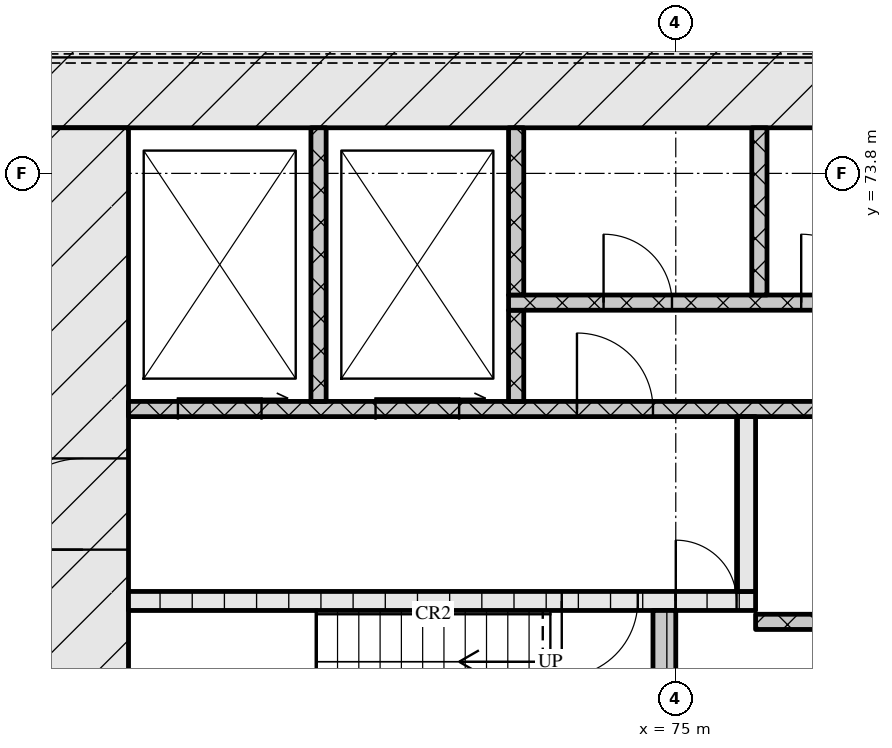
"""IFC4 building model, lengths in metres.
Left out: names, types, materials, properties, quantities, classifications, styles, units other than length and angle.
Written with IfcOpenShell. Run it as: python <this file> out.ifc"""

import sys

from ifc_helpers import new_model, si_unit, direction, frame, frame_2d, origin, place, context, subcontext, project, spatial, rectangle, extrude, element, fill, save


model = new_model("IFC4")
c1 = context("Model", 3, precision=1e-05, world=origin(), true_north=direction((0.0, 1.0)))
c2 = subcontext(c1, "Body", "Model", "MODEL_VIEW")
j1 = project(units=[si_unit("LENGTHUNIT", "METRE"), si_unit("PLANEANGLEUNIT", "RADIAN")], contexts=[c1])
p1 = place(None, origin())
s1 = spatial("IfcSite", under=j1, at=p1, CompositionType="ELEMENT")
p2 = place(p1, origin())
s2 = spatial("IfcBuilding", under=s1, at=p2, CompositionType="ELEMENT")
p3 = place(p2, frame((0.0, 0.0, 32.7)))
s3 = spatial("IfcBuildingStorey", under=s2, at=p3, CompositionType="ELEMENT", Elevation=32.7)
p4 = place(p3, frame((66.6, 75.0, 0.0), z_axis=(0.0, 0.0, 1.0), x_axis=(1.0, 0.0, 0.0)))
e1 = element("IfcWall", 1, at=p4, inside=s3, PredefinedType="SOLIDWALL", context=c2, shape_type="SweptSolid", body=[
    extrude(rectangle(XDim=42.0, YDim=1.2, at=frame_2d((21.0, 0.0))), origin(), (0.0, 0.0, 1.0), 4.22),
])
p5 = place(p3, frame((67.2, 62.4, 0.0), z_axis=(0.0, 0.0, 1.0), x_axis=(0.0, 1.0, 0.0)))
e2 = element("IfcWall", 2, at=p5, inside=s3, PredefinedType="SOLIDWALL", context=c2, shape_type="SweptSolid", body=[
    extrude(rectangle(XDim=12.0, YDim=1.2, at=frame_2d((6.0, 0.0))), origin(), (0.0, 0.0, 1.0), 4.22),
])
p6 = place(p5, frame((6.45, 0.0, 0.0)))
e3 = element("IfcOpeningElement", 3, at=p6, cuts=e2, PredefinedType="OPENING", context=c2, shape_type="SweptSolid", body=[
    extrude(rectangle(XDim=1.2, YDim=2.1, at=frame_2d((0.6, 1.05))), frame((0.0, 0.61, 0.0), z_axis=(0.0, -1.0, 0.0), x_axis=(1.0, 0.0, 0.0)), (0.0, 0.0, 1.0), 1.22),
])
p7 = place(p3, frame((74.85, 65.2, 0.0), z_axis=(0.0, 0.0, 1.0), x_axis=(0.0, 1.0, 0.0)))
e4 = element("IfcWall", 4, at=p7, inside=s3, PredefinedType="SOLIDWALL", context=c2, shape_type="SweptSolid", body=[
    extrude(rectangle(XDim=2.85, YDim=0.3, at=frame_2d((1.425, 0.0))), origin(), (0.0, 0.0, 1.0), 4.22),
])
p8 = place(p3, frame((76.05, 67.9, 0.0), z_axis=(0.0, 0.0, 1.0), x_axis=(1.0, 0.0, 0.0)))
e5 = element("IfcWall", 5, at=p8, inside=s3, PredefinedType="SOLIDWALL", context=c2, shape_type="SweptSolid", body=[
    extrude(rectangle(XDim=23.1, YDim=0.2, at=frame_2d((11.55, 0.0))), origin(), (0.0, 0.0, 1.0), 4.22),
])
p9 = place(p8, frame((8.35, 0.0, 0.0)))
e6 = element("IfcOpeningElement", 6, at=p9, cuts=e5, PredefinedType="OPENING", context=c2, shape_type="SweptSolid", body=[
    extrude(rectangle(XDim=1.1, YDim=2.1, at=frame_2d((0.55, 1.05))), frame((0.0, 0.11, 0.0), z_axis=(0.0, -1.0, 0.0), x_axis=(1.0, 0.0, 0.0)), (0.0, 0.0, 1.0), 0.22),
])
p10 = place(p8, frame((10.85, 0.0, 0.0)))
e7 = element("IfcOpeningElement", 7, at=p10, cuts=e5, PredefinedType="OPENING", context=c2, shape_type="SweptSolid", body=[
    extrude(rectangle(XDim=1.1, YDim=2.1, at=frame_2d((0.55, 1.05))), frame((0.0, 0.11, 0.0), z_axis=(0.0, -1.0, 0.0), x_axis=(1.0, 0.0, 0.0)), (0.0, 0.0, 1.0), 0.22),
])
p11 = place(p8, frame((13.55, 0.0, 0.0)))
e8 = element("IfcOpeningElement", 8, at=p11, cuts=e5, PredefinedType="OPENING", context=c2, shape_type="SweptSolid", body=[
    extrude(rectangle(XDim=1.0, YDim=2.1, at=frame_2d((0.5, 1.05))), frame((0.0, 0.11, 0.0), z_axis=(0.0, -1.0, 0.0), x_axis=(1.0, 0.0, 0.0)), (0.0, 0.0, 1.0), 0.22),
])
p12 = place(p3, frame((67.8, 68.175, 0.0), z_axis=(0.0, 0.0, 1.0), x_axis=(1.0, 0.0, 0.0)))
e9 = element("IfcWall", 9, at=p12, inside=s3, PredefinedType="SOLIDWALL", context=c2, shape_type="SweptSolid", body=[
    extrude(rectangle(XDim=8.25, YDim=0.25, at=frame_2d((4.125, 0.0))), origin(), (0.0, 0.0, 1.0), 4.22),
])
p13 = place(p12, frame((5.7, 0.0, 0.0)))
e10 = element("IfcOpeningElement", 10, at=p13, cuts=e9, PredefinedType="OPENING", context=c2, shape_type="SweptSolid", body=[
    extrude(rectangle(XDim=1.0, YDim=2.1, at=frame_2d((0.5, 1.05))), frame((0.0, 0.135, 0.0), z_axis=(0.0, -1.0, 0.0), x_axis=(1.0, 0.0, 0.0)), (0.0, 0.0, 1.0), 0.27),
])
p14 = place(p12, frame((7.2, 0.0, 0.0)))
e11 = element("IfcOpeningElement", 11, at=p14, cuts=e9, PredefinedType="OPENING", context=c2, shape_type="SweptSolid", body=[
    extrude(rectangle(XDim=0.8, YDim=2.1, at=frame_2d((0.4, 1.05))), frame((0.0, 0.135, 0.0), z_axis=(0.0, -1.0, 0.0), x_axis=(1.0, 0.0, 0.0)), (0.0, 0.0, 1.0), 0.27),
])
p15 = place(p3, frame((75.925, 68.3, 0.0), z_axis=(0.0, 0.0, 1.0), x_axis=(0.0, 1.0, 0.0)))
e12 = element("IfcWall", 12, at=p15, inside=s3, PredefinedType="SOLIDWALL", context=c2, shape_type="SweptSolid", body=[
    extrude(rectangle(XDim=2.3, YDim=0.25, at=frame_2d((1.15, 0.0))), origin(), (0.0, 0.0, 1.0), 4.22),
])
p16 = place(p3, frame((67.8, 70.7, 0.0), z_axis=(0.0, 0.0, 1.0), x_axis=(1.0, 0.0, 0.0)))
e13 = element("IfcWall", 13, at=p16, inside=s3, PredefinedType="SOLIDWALL", context=c2, shape_type="SweptSolid", body=[
    extrude(rectangle(XDim=39.6, YDim=0.2, at=frame_2d((19.8, 0.0))), origin(), (0.0, 0.0, 1.0), 4.22),
])
p17 = place(p16, frame((0.65, 0.0, 0.0)))
e14 = element("IfcOpeningElement", 14, at=p17, cuts=e13, PredefinedType="OPENING", context=c2, shape_type="SweptSolid", body=[
    extrude(rectangle(XDim=1.1, YDim=2.1, at=frame_2d((0.55, 1.05))), frame((0.0, 0.11, 0.0), z_axis=(0.0, -1.0, 0.0), x_axis=(1.0, 0.0, 0.0)), (0.0, 0.0, 1.0), 0.22),
])
p18 = place(p16, frame((3.25, 0.0, 0.0)))
e15 = element("IfcOpeningElement", 15, at=p18, cuts=e13, PredefinedType="OPENING", context=c2, shape_type="SweptSolid", body=[
    extrude(rectangle(XDim=1.1, YDim=2.1, at=frame_2d((0.55, 1.05))), frame((0.0, 0.11, 0.0), z_axis=(0.0, -1.0, 0.0), x_axis=(1.0, 0.0, 0.0)), (0.0, 0.0, 1.0), 0.22),
])
p19 = place(p16, frame((5.9, 0.0, 0.0)))
e16 = element("IfcOpeningElement", 16, at=p19, cuts=e13, PredefinedType="OPENING", context=c2, shape_type="SweptSolid", body=[
    extrude(rectangle(XDim=1.0, YDim=2.1, at=frame_2d((0.5, 1.05))), frame((0.0, 0.11, 0.0), z_axis=(0.0, -1.0, 0.0), x_axis=(1.0, 0.0, 0.0)), (0.0, 0.0, 1.0), 0.22),
])
p20 = place(p16, frame((21.7, 0.0, 0.0)))
e17 = element("IfcOpeningElement", 17, at=p20, cuts=e13, PredefinedType="OPENING", context=c2, shape_type="SweptSolid", body=[
    extrude(rectangle(XDim=1.0, YDim=2.1, at=frame_2d((0.5, 1.05))), frame((0.0, 0.11, 0.0), z_axis=(0.0, -1.0, 0.0), x_axis=(1.0, 0.0, 0.0)), (0.0, 0.0, 1.0), 0.22),
])
p21 = place(p16, frame((32.7, 0.0, 0.0)))
e18 = element("IfcOpeningElement", 18, at=p21, cuts=e13, PredefinedType="OPENING", context=c2, shape_type="SweptSolid", body=[
    extrude(rectangle(XDim=1.0, YDim=2.1, at=frame_2d((0.5, 1.05))), frame((0.0, 0.11, 0.0), z_axis=(0.0, -1.0, 0.0), x_axis=(1.0, 0.0, 0.0)), (0.0, 0.0, 1.0), 0.22),
])
p22 = place(p16, frame((35.25, 0.0, 0.0)))
e19 = element("IfcOpeningElement", 19, at=p22, cuts=e13, PredefinedType="OPENING", context=c2, shape_type="SweptSolid", body=[
    extrude(rectangle(XDim=1.1, YDim=2.1, at=frame_2d((0.55, 1.05))), frame((0.0, 0.11, 0.0), z_axis=(0.0, -1.0, 0.0), x_axis=(1.0, 0.0, 0.0)), (0.0, 0.0, 1.0), 0.22),
])
p23 = place(p16, frame((37.85, 0.0, 0.0)))
e20 = element("IfcOpeningElement", 20, at=p23, cuts=e13, PredefinedType="OPENING", context=c2, shape_type="SweptSolid", body=[
    extrude(rectangle(XDim=1.1, YDim=2.1, at=frame_2d((0.55, 1.05))), frame((0.0, 0.11, 0.0), z_axis=(0.0, -1.0, 0.0), x_axis=(1.0, 0.0, 0.0)), (0.0, 0.0, 1.0), 0.22),
])
p24 = place(p3, frame((70.3, 70.8, 0.0), z_axis=(0.0, 0.0, 1.0), x_axis=(0.0, 1.0, 0.0)))
e21 = element("IfcWall", 21, at=p24, inside=s3, PredefinedType="SOLIDWALL", context=c2, shape_type="SweptSolid", body=[
    extrude(rectangle(XDim=3.6, YDim=0.2, at=frame_2d((1.8, 0.0))), origin(), (0.0, 0.0, 1.0), 4.22),
])
p25 = place(p3, frame((72.9, 70.8, 0.0), z_axis=(0.0, 0.0, 1.0), x_axis=(0.0, 1.0, 0.0)))
e22 = element("IfcWall", 22, at=p25, inside=s3, PredefinedType="SOLIDWALL", context=c2, shape_type="SweptSolid", body=[
    extrude(rectangle(XDim=1.2, YDim=0.2, at=frame_2d((0.6, 0.0))), origin(), (0.0, 0.0, 1.0), 4.22),
])
p26 = place(p3, frame((72.8, 72.1, 0.0), z_axis=(0.0, 0.0, 1.0), x_axis=(1.0, 0.0, 0.0)))
e23 = element("IfcWall", 23, at=p26, inside=s3, PredefinedType="SOLIDWALL", context=c2, shape_type="SweptSolid", body=[
    extrude(rectangle(XDim=11.0, YDim=0.2, at=frame_2d((5.5, 0.0))), origin(), (0.0, 0.0, 1.0), 4.22),
])
p27 = place(p26, frame((1.25, 0.0, 0.0)))
e24 = element("IfcOpeningElement", 24, at=p27, cuts=e23, PredefinedType="OPENING", context=c2, shape_type="SweptSolid", body=[
    extrude(rectangle(XDim=0.9, YDim=2.1, at=frame_2d((0.45, 1.05))), frame((0.0, 0.11, 0.0), z_axis=(0.0, -1.0, 0.0), x_axis=(1.0, 0.0, 0.0)), (0.0, 0.0, 1.0), 0.22),
])
p28 = place(p26, frame((3.85, 0.0, 0.0)))
e25 = element("IfcOpeningElement", 25, at=p28, cuts=e23, PredefinedType="OPENING", context=c2, shape_type="SweptSolid", body=[
    extrude(rectangle(XDim=0.9, YDim=2.1, at=frame_2d((0.45, 1.05))), frame((0.0, 0.11, 0.0), z_axis=(0.0, -1.0, 0.0), x_axis=(1.0, 0.0, 0.0)), (0.0, 0.0, 1.0), 0.22),
])
p29 = place(p26, frame((6.42, 0.0, 0.0)))
e26 = element("IfcOpeningElement", 26, at=p29, cuts=e23, PredefinedType="OPENING", context=c2, shape_type="SweptSolid", body=[
    extrude(rectangle(XDim=0.9, YDim=2.1, at=frame_2d((0.45, 1.05))), frame((0.0, 0.11, 0.0), z_axis=(0.0, -1.0, 0.0), x_axis=(1.0, 0.0, 0.0)), (0.0, 0.0, 1.0), 0.22),
])
p30 = place(p26, frame((9.195, 0.0, 0.0)))
e27 = element("IfcOpeningElement", 27, at=p30, cuts=e23, PredefinedType="OPENING", context=c2, shape_type="SweptSolid", body=[
    extrude(rectangle(XDim=0.9, YDim=2.1, at=frame_2d((0.45, 1.05))), frame((0.0, 0.11, 0.0), z_axis=(0.0, -1.0, 0.0), x_axis=(1.0, 0.0, 0.0)), (0.0, 0.0, 1.0), 0.22),
])
for number, where, z_axis, x_axis in (
    (28, (72.9, 72.2, 0.0), (0.0, 0.0, 1.0), (0.0, 1.0, 0.0)),
    (29, (76.1, 72.2, 0.0), (0.0, 0.0, 1.0), (0.0, 1.0, 0.0)),
):
    element("IfcWall", number, at=place(p3, frame(where, z_axis=z_axis, x_axis=x_axis)), inside=s3, PredefinedType="SOLIDWALL", context=c2, shape_type="SweptSolid", body=[
        extrude(rectangle(XDim=2.2, YDim=0.2, at=frame_2d((1.1, 0.0))), origin(), (0.0, 0.0, 1.0), 4.22),
    ])
p31 = place(p13, origin())
e30 = element("IfcDoor", 30, at=p31, inside=s3, OperationType="SINGLE_SWING_RIGHT", PredefinedType="DOOR", context=c2, shape_type="SweptSolid", body=[
    extrude(rectangle(XDim=1.0, YDim=2.1, at=frame_2d((0.5, 1.05))), frame((0.0, 0.025, 0.0), z_axis=(0.0, -1.0, 0.0), x_axis=(1.0, 0.0, 0.0)), (0.0, 0.0, 1.0), 0.05),
])
fill(e10, e30)
p32 = place(p14, origin())
e31 = element("IfcDoor", 31, at=p32, inside=s3, OperationType="SINGLE_SWING_LEFT", PredefinedType="DOOR", context=c2, shape_type="SweptSolid", body=[
    extrude(rectangle(XDim=0.8, YDim=2.1, at=frame_2d((0.4, 1.05))), frame((0.0, 0.025, 0.0), z_axis=(0.0, -1.0, 0.0), x_axis=(1.0, 0.0, 0.0)), (0.0, 0.0, 1.0), 0.05),
])
fill(e11, e31)
p33 = place(p6, origin())
e32 = element("IfcDoor", 32, at=p33, inside=s3, OperationType="SINGLE_SWING_LEFT", PredefinedType="DOOR", context=c2, shape_type="SweptSolid", body=[
    extrude(rectangle(XDim=1.2, YDim=2.1, at=frame_2d((0.6, 1.05))), frame((0.0, 0.025, 0.0), z_axis=(0.0, -1.0, 0.0), x_axis=(1.0, 0.0, 0.0)), (0.0, 0.0, 1.0), 0.05),
])
fill(e3, e32)
p34 = place(p17, origin())
e33 = element("IfcDoor", 33, at=p34, inside=s3, OperationType="SLIDING_TO_RIGHT", PredefinedType="DOOR", context=c2, shape_type="SweptSolid", body=[
    extrude(rectangle(XDim=1.1, YDim=2.1, at=frame_2d((0.55, 1.05))), frame((0.0, 0.025, 0.0), z_axis=(0.0, -1.0, 0.0), x_axis=(1.0, 0.0, 0.0)), (0.0, 0.0, 1.0), 0.05),
])
fill(e14, e33)
p35 = place(p18, origin())
e34 = element("IfcDoor", 34, at=p35, inside=s3, OperationType="SLIDING_TO_RIGHT", PredefinedType="DOOR", context=c2, shape_type="SweptSolid", body=[
    extrude(rectangle(XDim=1.1, YDim=2.1, at=frame_2d((0.55, 1.05))), frame((0.0, 0.025, 0.0), z_axis=(0.0, -1.0, 0.0), x_axis=(1.0, 0.0, 0.0)), (0.0, 0.0, 1.0), 0.05),
])
fill(e15, e34)
p36 = place(p19, origin())
e35 = element("IfcDoor", 35, at=p36, inside=s3, OperationType="SINGLE_SWING_LEFT", PredefinedType="DOOR", context=c2, shape_type="SweptSolid", body=[
    extrude(rectangle(XDim=1.0, YDim=2.1, at=frame_2d((0.5, 1.05))), frame((0.0, 0.025, 0.0), z_axis=(0.0, -1.0, 0.0), x_axis=(1.0, 0.0, 0.0)), (0.0, 0.0, 1.0), 0.05),
])
fill(e16, e35)
p37 = place(p27, origin())
e36 = element("IfcDoor", 36, at=p37, inside=s3, OperationType="SINGLE_SWING_LEFT", PredefinedType="DOOR", context=c2, shape_type="SweptSolid", body=[
    extrude(rectangle(XDim=0.9, YDim=2.1, at=frame_2d((0.45, 1.05))), frame((0.0, 0.025, 0.0), z_axis=(0.0, -1.0, 0.0), x_axis=(1.0, 0.0, 0.0)), (0.0, 0.0, 1.0), 0.05),
])
fill(e24, e36)
p38 = place(p28, origin())
e37 = element("IfcDoor", 37, at=p38, inside=s3, OperationType="SINGLE_SWING_LEFT", PredefinedType="DOOR", context=c2, shape_type="SweptSolid", body=[
    extrude(rectangle(XDim=0.9, YDim=2.1, at=frame_2d((0.45, 1.05))), frame((0.0, 0.025, 0.0), z_axis=(0.0, -1.0, 0.0), x_axis=(1.0, 0.0, 0.0)), (0.0, 0.0, 1.0), 0.05),
])
fill(e25, e37)
save(model, sys.argv[1])
